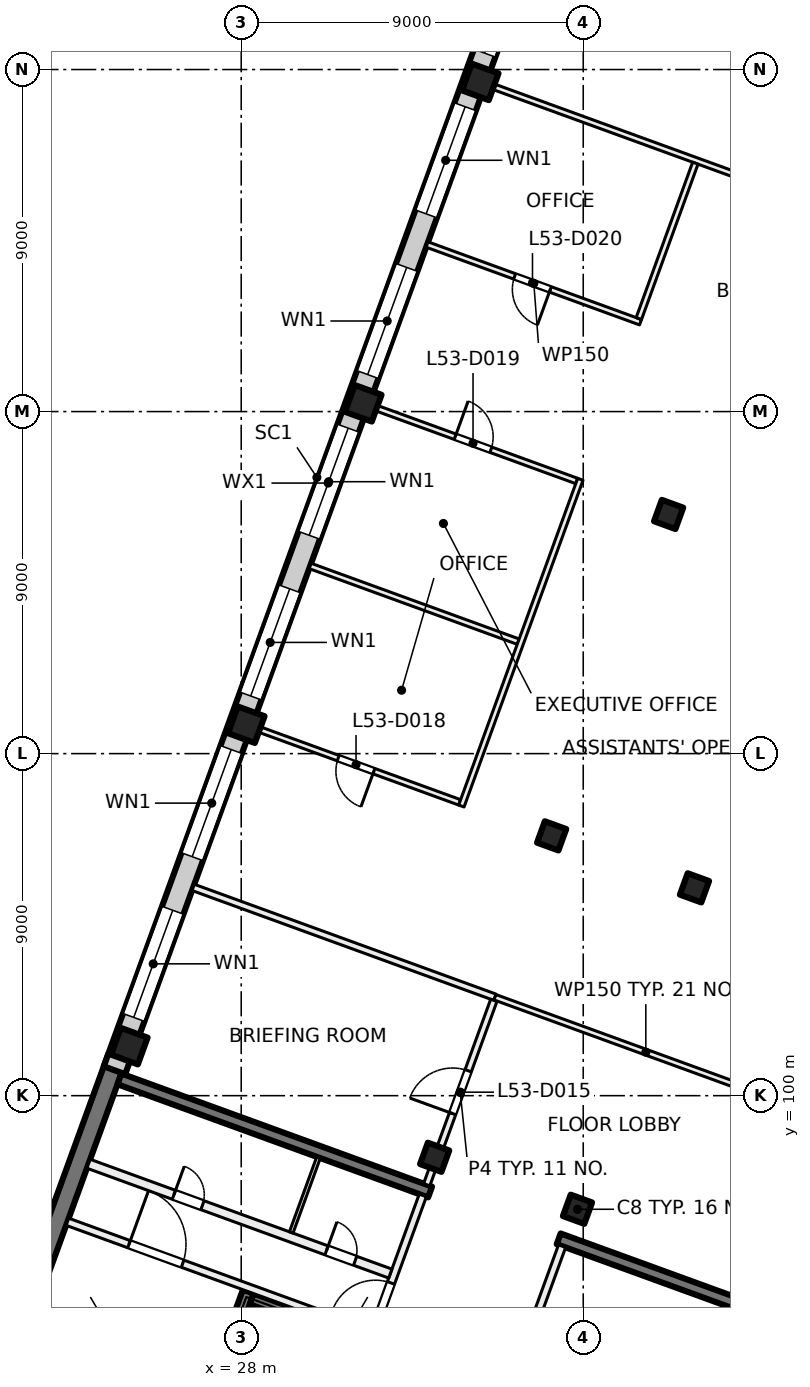
"""IFC4 building model, lengths in metres.
Left out: names, types, materials, properties, quantities, classifications, styles, units other than length and angle.
Written with IfcOpenShell. Run it as: python <this file> out.ifc"""

import sys

from ifc_helpers import new_model, si_unit, direction, frame, frame_2d, origin, origin_2d, place, context, subcontext, project, spatial, rectangle, extrude, element, fill, save


model = new_model("IFC4")
c1 = context("Model", 3, precision=1e-05, world=origin(), true_north=direction((0.0, 1.0)))
c2 = subcontext(c1, "Body", "Model", "MODEL_VIEW")
j1 = project(units=[si_unit("LENGTHUNIT", "METRE"), si_unit("PLANEANGLEUNIT", "RADIAN")], contexts=[c1])
p1 = place(None, origin())
s1 = spatial("IfcSite", under=j1, at=p1, CompositionType="ELEMENT")
p2 = place(p1, origin())
s2 = spatial("IfcBuilding", under=s1, at=p2, CompositionType="ELEMENT")
p3 = place(p2, frame((0.0, 0.0, 224.0)))
s3 = spatial("IfcBuildingStorey", under=s2, at=p3, CompositionType="ELEMENT", Elevation=224.0)
for number, where, z_axis, x_axis in (
    (1, (39.927, 105.468, 0.0), (0.0, 0.0, 1.0), (-0.342, -0.94, 0.0)),
    (2, (36.849, 97.011, 0.0), (0.0, 0.0, 1.0), (-0.342, -0.94, 0.0)),
    (3, (39.247, 115.293, 0.0), (0.0, 0.0, 1.0), (-0.342, -0.94, 0.0)),
    (4, (36.169, 106.836, 0.0), (0.0, 0.0, 1.0), (-0.342, -0.94, 0.0)),
    (5, (33.091, 98.379, 0.0), (0.0, 0.0, 1.0), (-0.342, -0.94, 0.0)),
):
    element("IfcColumn", number, at=place(p3, frame(where, z_axis=z_axis, x_axis=x_axis)), inside=s3, PredefinedType="COLUMN", context=c2, shape_type="SweptSolid", body=[
        extrude(rectangle(XDim=0.6, YDim=0.6, at=origin_2d()), origin(), (0.0, 0.0, 1.0), 4.0),
    ])
for number, where, z_axis, x_axis in (
    (6, (34.291, 126.675, 0.0), (0.0, 0.0, 1.0), (-0.342, -0.94, 0.0)),
    (7, (31.212, 118.218, 0.0), (0.0, 0.0, 1.0), (-0.342, -0.94, 0.0)),
    (8, (28.134, 109.76, 0.0), (0.0, 0.0, 1.0), (-0.342, -0.94, 0.0)),
    (9, (25.056, 101.303, 0.0), (0.0, 0.0, 1.0), (-0.342, -0.94, 0.0)),
):
    element("IfcColumn", number, at=place(p3, frame(where, z_axis=z_axis, x_axis=x_axis)), inside=s3, PredefinedType="COLUMN", context=c2, shape_type="SweptSolid", body=[
        extrude(rectangle(XDim=0.75, YDim=0.75, at=origin_2d()), origin(), (0.0, 0.0, 1.0), 4.0),
    ])
p4 = place(p3, frame((21.67, 92.585, 0.0), z_axis=(0.0, 0.0, 1.0), x_axis=(0.342035714298, 0.93968695327, 0.0)))
e10 = element("IfcWall", 10, at=p4, inside=s3, PredefinedType="SHEAR", context=c2, shape_type="SweptSolid", body=[
    extrude(rectangle(XDim=8.975, YDim=0.5, at=frame_2d((4.488, 0.0))), origin(), (0.0, 0.0, 1.0), 4.0),
])
p5 = place(p3, frame((23.996, 83.332, 0.0), z_axis=(0.0, 0.0, 1.0), x_axis=(0.342016684409, 0.939693879721, 0.0)))
e11 = element("IfcWall", 11, at=p5, inside=s3, PredefinedType="SHEAR", context=c2, shape_type="SweptSolid", body=[
    extrude(rectangle(XDim=12.25, YDim=0.3, at=frame_2d((6.125, 0.0))), origin(), (0.0, 0.0, 1.0), 4.0),
])
p6 = place(p5, frame((8.0, 0.0, 0.0)))
e12 = element("IfcOpeningElement", 12, at=p6, cuts=e11, PredefinedType="OPENING", context=c2, shape_type="SweptSolid", body=[
    extrude(rectangle(XDim=1.1, YDim=2.1, at=frame_2d((0.55, 1.05))), frame((0.0, 0.16, 0.0), z_axis=(0.0, -1.0, 0.0), x_axis=(1.0, 0.0, 0.0)), (0.0, 0.0, 1.0), 0.32),
])
p7 = place(p3, frame((31.188, 93.591, 0.0), z_axis=(0.0, 0.0, 1.0), x_axis=(-0.939680694448, 0.342052908892, 0.0)))
e13 = element("IfcWall", 13, at=p7, inside=s3, PredefinedType="SHEAR", context=c2, shape_type="SweptSolid", body=[
    extrude(rectangle(XDim=3.1, YDim=0.3, at=frame_2d((1.55, 0.0))), origin(), (0.0, 0.0, 1.0), 4.0),
])
p8 = place(p3, frame((44.529, 93.258, 0.0), z_axis=(0.0, 0.0, 1.0), x_axis=(-0.9396917844, 0.342022441267, 0.0)))
e14 = element("IfcWall", 14, at=p8, inside=s3, PredefinedType="SHEAR", context=c2, shape_type="SweptSolid", body=[
    extrude(rectangle(XDim=8.7, YDim=0.3, at=frame_2d((4.35, 0.0))), origin(), (0.0, 0.0, 1.0), 4.0),
])
p9 = place(p3, frame((32.971, 97.465, 0.0), z_axis=(0.0, 0.0, 1.0), x_axis=(-0.939695066972, 0.34201342241, 0.0)))
e15 = element("IfcWall", 15, at=p9, inside=s3, PredefinedType="SHEAR", context=c2, shape_type="SweptSolid", body=[
    extrude(rectangle(XDim=8.7, YDim=0.3, at=frame_2d((4.35, 0.0))), origin(), (0.0, 0.0, 1.0), 4.0),
])
p10 = place(p3, frame((24.666, 100.669, 0.0), z_axis=(0.0, 0.0, 1.0), x_axis=(0.34201964167, 0.939692803373, 0.0)))
e16 = element("IfcWall", 16, at=p10, inside=s3, PredefinedType="SOLIDWALL", context=c2, shape_type="SweptSolid", body=[
    extrude(rectangle(XDim=32.884, YDim=0.6, at=frame_2d((16.442, 0.0))), origin(), (0.0, 0.0, 1.0), 3.625),
])
p11 = place(p10, frame((1.48, 0.0, 0.9)))
e17 = element("IfcOpeningElement", 17, at=p11, cuts=e16, PredefinedType="OPENING", context=c2, shape_type="SweptSolid", body=[
    extrude(rectangle(XDim=3.0, YDim=2.4, at=frame_2d((1.5, 1.2))), frame((0.0, 0.31, 0.0), z_axis=(0.0, -1.0, 0.0), x_axis=(1.0, 0.0, 0.0)), (0.0, 0.0, 1.0), 0.62),
])
p12 = place(p10, frame((5.98, 0.0, 0.9)))
e18 = element("IfcOpeningElement", 18, at=p12, cuts=e16, PredefinedType="OPENING", context=c2, shape_type="SweptSolid", body=[
    extrude(rectangle(XDim=3.0, YDim=2.4, at=frame_2d((1.5, 1.2))), frame((0.0, 0.31, 0.0), z_axis=(0.0, -1.0, 0.0), x_axis=(1.0, 0.0, 0.0)), (0.0, 0.0, 1.0), 0.62),
])
p13 = place(p10, frame((10.48, 0.0, 0.9)))
e19 = element("IfcOpeningElement", 19, at=p13, cuts=e16, PredefinedType="OPENING", context=c2, shape_type="SweptSolid", body=[
    extrude(rectangle(XDim=3.0, YDim=2.4, at=frame_2d((1.5, 1.2))), frame((0.0, 0.31, 0.0), z_axis=(0.0, -1.0, 0.0), x_axis=(1.0, 0.0, 0.0)), (0.0, 0.0, 1.0), 0.62),
])
p14 = place(p10, frame((14.98, 0.0, 0.9)))
e20 = element("IfcOpeningElement", 20, at=p14, cuts=e16, PredefinedType="OPENING", context=c2, shape_type="SweptSolid", body=[
    extrude(rectangle(XDim=3.0, YDim=2.4, at=frame_2d((1.5, 1.2))), frame((0.0, 0.31, 0.0), z_axis=(0.0, -1.0, 0.0), x_axis=(1.0, 0.0, 0.0)), (0.0, 0.0, 1.0), 0.62),
])
p15 = place(p10, frame((19.48, 0.0, 0.9)))
e21 = element("IfcOpeningElement", 21, at=p15, cuts=e16, PredefinedType="OPENING", context=c2, shape_type="SweptSolid", body=[
    extrude(rectangle(XDim=3.0, YDim=2.4, at=frame_2d((1.5, 1.2))), frame((0.0, 0.31, 0.0), z_axis=(0.0, -1.0, 0.0), x_axis=(1.0, 0.0, 0.0)), (0.0, 0.0, 1.0), 0.62),
])
p16 = place(p10, frame((23.98, 0.0, 0.9)))
e22 = element("IfcOpeningElement", 22, at=p16, cuts=e16, PredefinedType="OPENING", context=c2, shape_type="SweptSolid", body=[
    extrude(rectangle(XDim=3.0, YDim=2.4, at=frame_2d((1.5, 1.2))), frame((0.0, 0.31, 0.0), z_axis=(0.0, -1.0, 0.0), x_axis=(1.0, 0.0, 0.0)), (0.0, 0.0, 1.0), 0.62),
])
p17 = place(p10, frame((28.48, 0.0, 0.9)))
e23 = element("IfcOpeningElement", 23, at=p17, cuts=e16, PredefinedType="OPENING", context=c2, shape_type="SweptSolid", body=[
    extrude(rectangle(XDim=3.0, YDim=2.4, at=frame_2d((1.5, 1.2))), frame((0.0, 0.31, 0.0), z_axis=(0.0, -1.0, 0.0), x_axis=(1.0, 0.0, 0.0)), (0.0, 0.0, 1.0), 0.62),
])
p18 = place(p3, frame((31.427, 93.663, 0.0), z_axis=(0.0, 0.0, 1.0), x_axis=(0.342030870568, 0.93968871632, 0.0)))
e24 = element("IfcWall", 24, at=p18, inside=s3, PredefinedType="PARTITIONING", context=c2, shape_type="SweptSolid", body=[
    extrude(rectangle(XDim=3.95, YDim=0.2, at=frame_2d((1.975, 0.0))), origin(), (0.0, 0.0, 1.0), 3.625),
])
p19 = place(p18, frame((0.3, 0.0, 0.0)))
e25 = element("IfcOpeningElement", 25, at=p19, cuts=e24, PredefinedType="OPENING", context=c2, shape_type="SweptSolid", body=[
    extrude(rectangle(XDim=1.2, YDim=2.1, at=frame_2d((0.6, 1.05))), frame((0.0, 0.11, 0.0), z_axis=(0.0, -1.0, 0.0), x_axis=(1.0, 0.0, 0.0)), (0.0, 0.0, 1.0), 0.22),
])
p20 = place(p3, frame((23.427, 96.682, 0.0), z_axis=(0.0, 0.0, 1.0), x_axis=(0.939690465531, -0.342026064782, 0.0)))
e26 = element("IfcWall", 26, at=p20, inside=s3, PredefinedType="PARTITIONING", context=c2, shape_type="SweptSolid", body=[
    extrude(rectangle(XDim=8.45, YDim=0.2, at=frame_2d((4.225, 0.0))), origin(), (0.0, 0.0, 1.0), 3.625),
])
p21 = place(p20, frame((1.725, 0.0, 0.0)))
e27 = element("IfcOpeningElement", 27, at=p21, cuts=e26, PredefinedType="OPENING", context=c2, shape_type="SweptSolid", body=[
    extrude(rectangle(XDim=1.5, YDim=2.1, at=frame_2d((0.75, 1.05))), frame((0.0, 0.11, 0.0), z_axis=(0.0, -1.0, 0.0), x_axis=(1.0, 0.0, 0.0)), (0.0, 0.0, 1.0), 0.22),
])
p22 = place(p3, frame((23.983, 98.208, 0.0), z_axis=(0.0, 0.0, 1.0), x_axis=(0.939699751196, -0.342000552051, 0.0)))
e28 = element("IfcWall", 28, at=p22, inside=s3, PredefinedType="PARTITIONING", context=c2, shape_type="SweptSolid", body=[
    extrude(rectangle(XDim=8.45, YDim=0.25, at=frame_2d((4.225, 0.0))), origin(), (0.0, 0.0, 1.0), 3.625),
])
p23 = place(p22, frame((6.665, 0.0, 0.0)))
e29 = element("IfcOpeningElement", 29, at=p23, cuts=e28, PredefinedType="OPENING", context=c2, shape_type="SweptSolid", body=[
    extrude(rectangle(XDim=0.8, YDim=2.1, at=frame_2d((0.4, 1.05))), frame((0.0, 0.135, 0.0), z_axis=(0.0, -1.0, 0.0), x_axis=(1.0, 0.0, 0.0)), (0.0, 0.0, 1.0), 0.27),
])
p24 = place(p22, frame((2.39, 0.0, 0.0)))
e30 = element("IfcOpeningElement", 30, at=p24, cuts=e28, PredefinedType="OPENING", context=c2, shape_type="SweptSolid", body=[
    extrude(rectangle(XDim=0.8, YDim=2.1, at=frame_2d((0.4, 1.05))), frame((0.0, 0.135, 0.0), z_axis=(0.0, -1.0, 0.0), x_axis=(1.0, 0.0, 0.0)), (0.0, 0.0, 1.0), 0.27),
])
p25 = place(p3, frame((29.316, 96.4, 0.0), z_axis=(0.0, 0.0, 1.0), x_axis=(0.342023078919, 0.939691552312, 0.0)))
e31 = element("IfcWall", 31, at=p25, inside=s3, PredefinedType="PARTITIONING", context=c2, shape_type="SweptSolid", body=[
    extrude(rectangle(XDim=2.1, YDim=0.1, at=frame_2d((1.05, 0.0))), origin(), (0.0, 0.0, 1.0), 3.625),
])
p26 = place(p3, frame((36.443, 96.041, 0.0), z_axis=(0.0, 0.0, 1.0), x_axis=(-0.341996156931, -0.939701350773, 0.0)))
e32 = element("IfcWall", 32, at=p26, inside=s3, PredefinedType="PARTITIONING", context=c2, shape_type="SweptSolid", body=[
    extrude(rectangle(XDim=3.95, YDim=0.2, at=frame_2d((1.975, 0.0))), origin(), (0.0, 0.0, 1.0), 3.625),
])
p27 = place(p26, frame((2.45, 0.0, 0.0)))
e33 = element("IfcOpeningElement", 33, at=p27, cuts=e32, PredefinedType="OPENING", context=c2, shape_type="SweptSolid", body=[
    extrude(rectangle(XDim=1.2, YDim=2.1, at=frame_2d((0.6, 1.05))), frame((0.0, 0.11, 0.0), z_axis=(0.0, -1.0, 0.0), x_axis=(1.0, 0.0, 0.0)), (0.0, 0.0, 1.0), 0.22),
])
p28 = place(p3, frame((26.736, 105.48, 0.0), z_axis=(0.0, 0.0, 1.0), x_axis=(0.939706509432, -0.341981982173, 0.0)))
e34 = element("IfcWall", 34, at=p28, inside=s3, PredefinedType="PARTITIONING", context=c2, shape_type="SweptSolid", body=[
    extrude(rectangle(XDim=8.45, YDim=0.175, at=frame_2d((4.225, 0.0))), origin(), (0.0, 0.0, 1.0), 3.625),
])
p29 = place(p3, frame((29.814, 113.938, 0.0), z_axis=(0.0, 0.0, 1.0), x_axis=(0.939738354986, -0.341894463495, 0.0)))
e35 = element("IfcWall", 35, at=p29, inside=s3, PredefinedType="PARTITIONING", context=c2, shape_type="SweptSolid", body=[
    extrude(rectangle(XDim=5.826, YDim=0.15, at=frame_2d((2.913, 0.0))), origin(), (0.0, 0.0, 1.0), 3.625),
])
p30 = place(p3, frame((31.353, 118.166, 0.0), z_axis=(0.0, 0.0, 1.0), x_axis=(0.939733456466, -0.341907927371, 0.0)))
e36 = element("IfcWall", 36, at=p30, inside=s3, PredefinedType="PARTITIONING", context=c2, shape_type="SweptSolid", body=[
    extrude(rectangle(XDim=5.826, YDim=0.15, at=frame_2d((2.913, 0.0))), origin(), (0.0, 0.0, 1.0), 3.625),
])
p31 = place(p30, frame((2.423, 0.0, 0.0)))
e37 = element("IfcOpeningElement", 37, at=p31, cuts=e36, PredefinedType="OPENING", context=c2, shape_type="SweptSolid", body=[
    extrude(rectangle(XDim=1.0, YDim=2.1, at=frame_2d((0.5, 1.05))), frame((0.0, 0.085, 0.0), z_axis=(0.0, -1.0, 0.0), x_axis=(1.0, 0.0, 0.0)), (0.0, 0.0, 1.0), 0.17),
])
p32 = place(p3, frame((33.749, 107.717, 0.0), z_axis=(0.0, 0.0, 1.0), x_axis=(-0.939718757431, 0.341948324943, 0.0)))
e38 = element("IfcWall", 38, at=p32, inside=s3, PredefinedType="PARTITIONING", context=c2, shape_type="SweptSolid", body=[
    extrude(rectangle(XDim=5.825, YDim=0.15, at=frame_2d((2.913, 0.0))), origin(), (0.0, 0.0, 1.0), 3.625),
])
p33 = place(p32, frame((2.403, 0.0, 0.0)))
e39 = element("IfcOpeningElement", 39, at=p33, cuts=e38, PredefinedType="OPENING", context=c2, shape_type="SweptSolid", body=[
    extrude(rectangle(XDim=1.0, YDim=2.1, at=frame_2d((0.5, 1.05))), frame((0.0, 0.085, 0.0), z_axis=(0.0, -1.0, 0.0), x_axis=(1.0, 0.0, 0.0)), (0.0, 0.0, 1.0), 0.17),
])
p34 = place(p3, frame((36.924, 116.218, 0.0), z_axis=(0.0, 0.0, 1.0), x_axis=(-0.342220796767, -0.939619564643, 0.0)))
e40 = element("IfcWall", 40, at=p34, inside=s3, PredefinedType="PARTITIONING", context=c2, shape_type="SweptSolid", body=[
    extrude(rectangle(XDim=9.149, YDim=0.15, at=frame_2d((4.575, 0.0))), origin(), (0.0, 0.0, 1.0), 3.625),
])
p35 = place(p3, frame((34.431, 126.624, 0.0), z_axis=(0.0, 0.0, 1.0), x_axis=(0.939703144457, -0.341991228392, 0.0)))
e41 = element("IfcWall", 41, at=p35, inside=s3, PredefinedType="PARTITIONING", context=c2, shape_type="SweptSolid", body=[
    extrude(rectangle(XDim=12.401, YDim=0.15, at=frame_2d((6.2, 0.0))), origin(), (0.0, 0.0, 1.0), 3.625),
])
p36 = place(p3, frame((32.881, 97.657, 0.0), z_axis=(0.0, 0.0, 1.0), x_axis=(0.342058204353, 0.939678766832, 0.0)))
e42 = element("IfcWall", 42, at=p36, inside=s3, PredefinedType="PARTITIONING", context=c2, shape_type="SweptSolid", body=[
    extrude(rectangle(XDim=5.163, YDim=0.175, at=frame_2d((2.581, 0.0))), origin(), (0.0, 0.0, 1.0), 3.625),
])
p37 = place(p36, frame((1.991, 0.0, 0.0)))
e43 = element("IfcOpeningElement", 43, at=p37, cuts=e42, PredefinedType="OPENING", context=c2, shape_type="SweptSolid", body=[
    extrude(rectangle(XDim=1.2, YDim=2.1, at=frame_2d((0.6, 1.05))), frame((0.0, 0.097, 0.0), z_axis=(0.0, -1.0, 0.0), x_axis=(1.0, 0.0, 0.0)), (0.0, 0.0, 1.0), 0.195),
])
p38 = place(p3, frame((34.677, 102.59, 0.0), z_axis=(0.0, 0.0, 1.0), x_axis=(0.939683705252, -0.342044637561, 0.0)))
e44 = element("IfcWall", 44, at=p38, inside=s3, PredefinedType="PARTITIONING", context=c2, shape_type="SweptSolid", body=[
    extrude(rectangle(XDim=8.45, YDim=0.15, at=frame_2d((4.225, 0.0))), origin(), (0.0, 0.0, 1.0), 3.625),
])
p39 = place(p3, frame((38.507, 120.351, 0.0), z_axis=(0.0, 0.0, 1.0), x_axis=(-0.939678850769, 0.342057973766, 0.0)))
e45 = element("IfcWall", 45, at=p39, inside=s3, PredefinedType="PARTITIONING", context=c2, shape_type="SweptSolid", body=[
    extrude(rectangle(XDim=5.975, YDim=0.15, at=frame_2d((2.988, 0.0))), origin(), (0.0, 0.0, 1.0), 3.625),
])
p40 = place(p39, frame((2.525, 0.0, 0.0)))
e46 = element("IfcOpeningElement", 46, at=p40, cuts=e45, PredefinedType="OPENING", context=c2, shape_type="SweptSolid", body=[
    extrude(rectangle(XDim=1.0, YDim=2.1, at=frame_2d((0.5, 1.05))), frame((0.0, 0.085, 0.0), z_axis=(0.0, -1.0, 0.0), x_axis=(1.0, 0.0, 0.0)), (0.0, 0.0, 1.0), 0.17),
])
p41 = place(p3, frame((39.95, 124.536, 0.0), z_axis=(0.0, 0.0, 1.0), x_axis=(-0.341783611499, -0.939778677621, 0.0)))
e47 = element("IfcWall", 47, at=p41, inside=s3, PredefinedType="PARTITIONING", context=c2, shape_type="SweptSolid", body=[
    extrude(rectangle(XDim=4.351, YDim=0.15, at=frame_2d((2.175, 0.0))), origin(), (0.0, 0.0, 1.0), 3.625),
])
p42 = place(p11, origin())
e48 = element("IfcWindow", 48, at=p42, inside=s3, PartitioningType="SINGLE_PANEL", PredefinedType="WINDOW", context=c2, shape_type="SweptSolid", body=[
    extrude(rectangle(XDim=3.0, YDim=2.4, at=frame_2d((1.5, 1.2))), frame((0.0, 0.03, 0.0), z_axis=(0.0, -1.0, 0.0), x_axis=(1.0, 0.0, 0.0)), (0.0, 0.0, 1.0), 0.06),
])
fill(e17, e48)
p43 = place(p12, origin())
e49 = element("IfcWindow", 49, at=p43, inside=s3, PartitioningType="SINGLE_PANEL", PredefinedType="WINDOW", context=c2, shape_type="SweptSolid", body=[
    extrude(rectangle(XDim=3.0, YDim=2.4, at=frame_2d((1.5, 1.2))), frame((0.0, 0.03, 0.0), z_axis=(0.0, -1.0, 0.0), x_axis=(1.0, 0.0, 0.0)), (0.0, 0.0, 1.0), 0.06),
])
fill(e18, e49)
p44 = place(p13, origin())
e50 = element("IfcWindow", 50, at=p44, inside=s3, PartitioningType="SINGLE_PANEL", PredefinedType="WINDOW", context=c2, shape_type="SweptSolid", body=[
    extrude(rectangle(XDim=3.0, YDim=2.4, at=frame_2d((1.5, 1.2))), frame((0.0, 0.03, 0.0), z_axis=(0.0, -1.0, 0.0), x_axis=(1.0, 0.0, 0.0)), (0.0, 0.0, 1.0), 0.06),
])
fill(e19, e50)
p45 = place(p14, origin())
e51 = element("IfcWindow", 51, at=p45, inside=s3, PartitioningType="SINGLE_PANEL", PredefinedType="WINDOW", context=c2, shape_type="SweptSolid", body=[
    extrude(rectangle(XDim=3.0, YDim=2.4, at=frame_2d((1.5, 1.2))), frame((0.0, 0.03, 0.0), z_axis=(0.0, -1.0, 0.0), x_axis=(1.0, 0.0, 0.0)), (0.0, 0.0, 1.0), 0.06),
])
fill(e20, e51)
p46 = place(p15, origin())
e52 = element("IfcWindow", 52, at=p46, inside=s3, PartitioningType="SINGLE_PANEL", PredefinedType="WINDOW", context=c2, shape_type="SweptSolid", body=[
    extrude(rectangle(XDim=3.0, YDim=2.4, at=frame_2d((1.5, 1.2))), frame((0.0, 0.03, 0.0), z_axis=(0.0, -1.0, 0.0), x_axis=(1.0, 0.0, 0.0)), (0.0, 0.0, 1.0), 0.06),
])
fill(e21, e52)
p47 = place(p16, origin())
e53 = element("IfcWindow", 53, at=p47, inside=s3, PartitioningType="SINGLE_PANEL", PredefinedType="WINDOW", context=c2, shape_type="SweptSolid", body=[
    extrude(rectangle(XDim=3.0, YDim=2.4, at=frame_2d((1.5, 1.2))), frame((0.0, 0.03, 0.0), z_axis=(0.0, -1.0, 0.0), x_axis=(1.0, 0.0, 0.0)), (0.0, 0.0, 1.0), 0.06),
])
fill(e22, e53)
p48 = place(p17, origin())
e54 = element("IfcWindow", 54, at=p48, inside=s3, PartitioningType="SINGLE_PANEL", PredefinedType="WINDOW", context=c2, shape_type="SweptSolid", body=[
    extrude(rectangle(XDim=3.0, YDim=2.4, at=frame_2d((1.5, 1.2))), frame((0.0, 0.03, 0.0), z_axis=(0.0, -1.0, 0.0), x_axis=(1.0, 0.0, 0.0)), (0.0, 0.0, 1.0), 0.06),
])
fill(e23, e54)
p49 = place(p19, origin())
e55 = element("IfcDoor", 55, at=p49, inside=s3, OperationType="DOUBLE_DOOR_SINGLE_SWING", PredefinedType="DOOR", context=c2, shape_type="SweptSolid", body=[
    extrude(rectangle(XDim=1.2, YDim=2.1, at=frame_2d((0.6, 1.05))), frame((0.0, 0.025, 0.0), z_axis=(0.0, -1.0, 0.0), x_axis=(1.0, 0.0, 0.0)), (0.0, 0.0, 1.0), 0.05),
])
fill(e25, e55)
p50 = place(p21, origin())
e56 = element("IfcDoor", 56, at=p50, inside=s3, OperationType="DOUBLE_DOOR_SINGLE_SWING", PredefinedType="DOOR", context=c2, shape_type="SweptSolid", body=[
    extrude(rectangle(XDim=1.5, YDim=2.1, at=frame_2d((0.75, 1.05))), frame((0.0, 0.025, 0.0), z_axis=(0.0, -1.0, 0.0), x_axis=(1.0, 0.0, 0.0)), (0.0, 0.0, 1.0), 0.05),
])
fill(e27, e56)
p51 = place(p23, origin())
e57 = element("IfcDoor", 57, at=p51, inside=s3, OperationType="SINGLE_SWING_LEFT", PredefinedType="DOOR", context=c2, shape_type="SweptSolid", body=[
    extrude(rectangle(XDim=0.8, YDim=2.1, at=frame_2d((0.4, 1.05))), frame((0.0, 0.025, 0.0), z_axis=(0.0, -1.0, 0.0), x_axis=(1.0, 0.0, 0.0)), (0.0, 0.0, 1.0), 0.05),
])
fill(e29, e57)
p52 = place(p24, origin())
e58 = element("IfcDoor", 58, at=p52, inside=s3, OperationType="SINGLE_SWING_RIGHT", PredefinedType="DOOR", context=c2, shape_type="SweptSolid", body=[
    extrude(rectangle(XDim=0.8, YDim=2.1, at=frame_2d((0.4, 1.05))), frame((0.0, 0.025, 0.0), z_axis=(0.0, -1.0, 0.0), x_axis=(1.0, 0.0, 0.0)), (0.0, 0.0, 1.0), 0.05),
])
fill(e30, e58)
p53 = place(p37, origin())
e59 = element("IfcDoor", 59, at=p53, inside=s3, OperationType="DOUBLE_DOOR_SINGLE_SWING", PredefinedType="DOOR", context=c2, shape_type="SweptSolid", body=[
    extrude(rectangle(XDim=1.2, YDim=2.1, at=frame_2d((0.6, 1.05))), frame((0.0, 0.025, 0.0), z_axis=(0.0, -1.0, 0.0), x_axis=(1.0, 0.0, 0.0)), (0.0, 0.0, 1.0), 0.05),
])
fill(e43, e59)
p54 = place(p33, origin())
e60 = element("IfcDoor", 60, at=p54, inside=s3, OperationType="SINGLE_SWING_LEFT", PredefinedType="DOOR", context=c2, shape_type="SweptSolid", body=[
    extrude(rectangle(XDim=1.0, YDim=2.1, at=frame_2d((0.5, 1.05))), frame((0.0, 0.025, 0.0), z_axis=(0.0, -1.0, 0.0), x_axis=(1.0, 0.0, 0.0)), (0.0, 0.0, 1.0), 0.05),
])
fill(e39, e60)
p55 = place(p31, origin())
e61 = element("IfcDoor", 61, at=p55, inside=s3, OperationType="SINGLE_SWING_LEFT", PredefinedType="DOOR", context=c2, shape_type="SweptSolid", body=[
    extrude(rectangle(XDim=1.0, YDim=2.1, at=frame_2d((0.5, 1.05))), frame((0.0, 0.025, 0.0), z_axis=(0.0, -1.0, 0.0), x_axis=(1.0, 0.0, 0.0)), (0.0, 0.0, 1.0), 0.05),
])
fill(e37, e61)
p56 = place(p40, origin())
e62 = element("IfcDoor", 62, at=p56, inside=s3, OperationType="SINGLE_SWING_LEFT", PredefinedType="DOOR", context=c2, shape_type="SweptSolid", body=[
    extrude(rectangle(XDim=1.0, YDim=2.1, at=frame_2d((0.5, 1.05))), frame((0.0, 0.025, 0.0), z_axis=(0.0, -1.0, 0.0), x_axis=(1.0, 0.0, 0.0)), (0.0, 0.0, 1.0), 0.05),
])
fill(e46, e62)
save(model, sys.argv[1])
